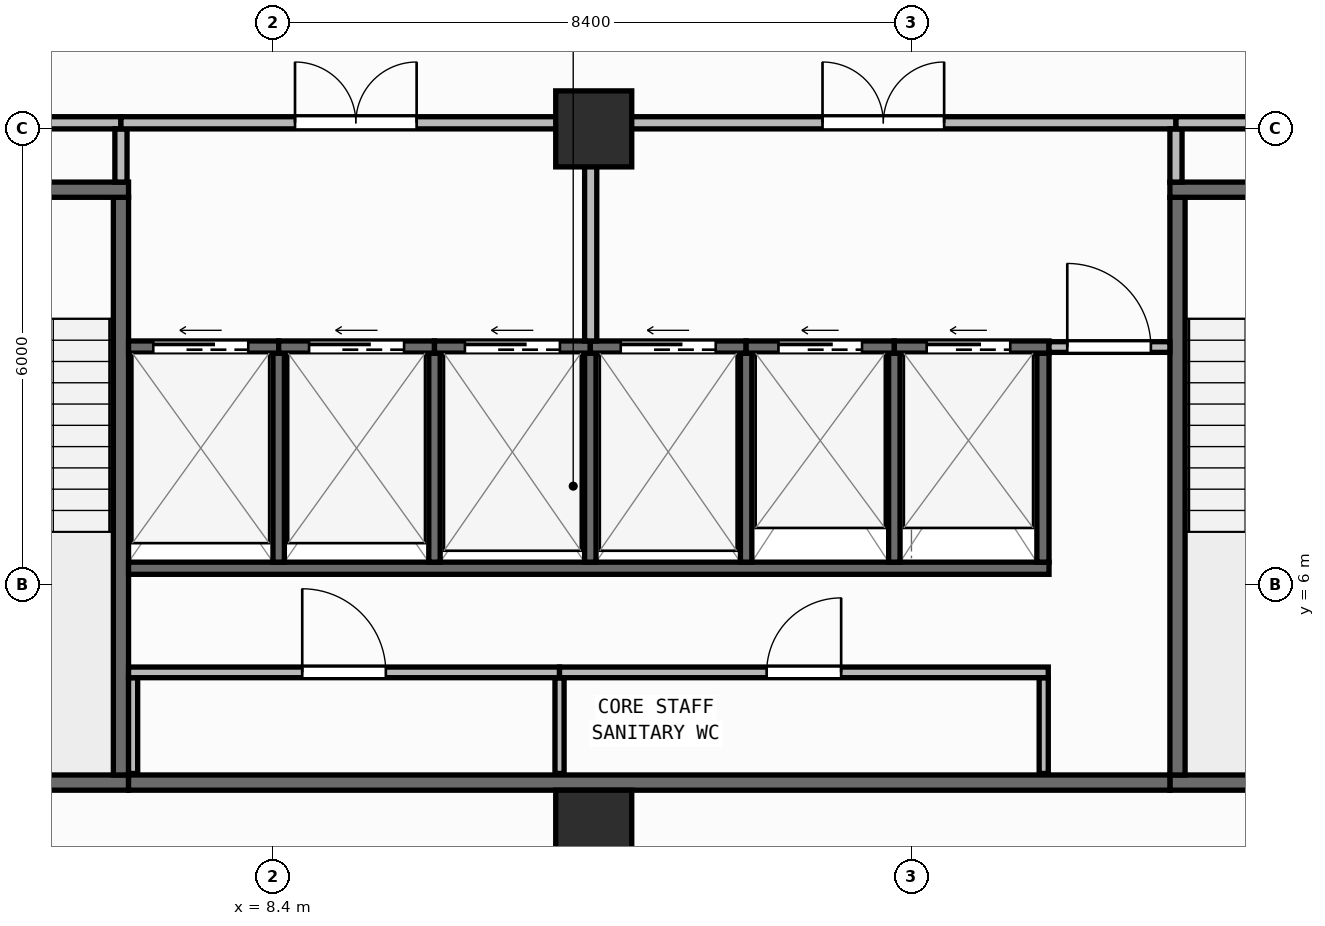
"""IFC4 building model, lengths in metres.
Left out: names, types, materials, properties, quantities, classifications, styles, units other than length and angle.
Written with IfcOpenShell. Run it as: python <this file> out.ifc"""

import sys

from ifc_helpers import new_model, si_unit, direction, frame, frame_2d, origin, origin_2d, place, context, subcontext, project, spatial, rectangle, extrude, element, fill, save


model = new_model("IFC4")
c1 = context("Model", 3, precision=1e-05, world=origin(), true_north=direction((0.0, 1.0)))
c2 = subcontext(c1, "Body", "Model", "MODEL_VIEW")
j1 = project(units=[si_unit("LENGTHUNIT", "METRE"), si_unit("PLANEANGLEUNIT", "RADIAN")], contexts=[c1])
p1 = place(None, origin())
s1 = spatial("IfcSite", under=j1, at=p1, CompositionType="ELEMENT")
p2 = place(p1, origin())
s2 = spatial("IfcBuilding", under=s1, at=p2, CompositionType="ELEMENT")
p3 = place(p2, frame((0.0, 0.0, 188.15)))
s3 = spatial("IfcBuildingStorey", under=s2, at=p3, CompositionType="ELEMENT", Elevation=188.15)
for number, where, z_axis, x_axis in (
    (1, (12.62, 2.8, 0.0), (0.0, 0.0, 1.0), (1.0, 0.0, 0.0)),
    (2, (12.62, 12.0, 0.0), (0.0, 0.0, 1.0), (1.0, 0.0, 0.0)),
):
    element("IfcColumn", number, at=place(p3, frame(where, z_axis=z_axis, x_axis=x_axis)), inside=s3, PredefinedType="COLUMN", context=c2, shape_type="SweptSolid", body=[
        extrude(rectangle(XDim=1.0, YDim=1.0, at=origin_2d()), origin(), (0.0, 0.0, 1.0), 3.95),
    ])
p4 = place(p3, frame((2.66, 0.174, 0.0), z_axis=(0.0, 0.0, 1.0), x_axis=(0.996634028439, 0.081979347142, 0.0)))
e3 = element("IfcWall", 3, at=p4, inside=s3, PredefinedType="STANDARD", context=c2, shape_type="SweptSolid", body=[
    extrude(rectangle(XDim=46.035, YDim=0.26, at=frame_2d((23.018, 0.0))), origin(), (0.0, 0.0, 1.0), 3.71),
])
p5 = place(p4, frame((21.817, 0.0, 0.9)))
e4 = element("IfcOpeningElement", 4, at=p5, cuts=e3, PredefinedType="OPENING", context=c2, shape_type="SweptSolid", body=[
    extrude(rectangle(XDim=2.4, YDim=1.65, at=frame_2d((1.2, 0.825))), frame((0.0, 0.14, 0.0), z_axis=(0.0, -1.0, 0.0), x_axis=(1.0, 0.0, 0.0)), (0.0, 0.0, 1.0), 0.28),
])
p6 = place(p3, frame((2.8, 3.4, 0.0), z_axis=(0.0, 0.0, 1.0), x_axis=(1.0, 0.0, 0.0)))
e5 = element("IfcWall", 5, at=p6, inside=s3, PredefinedType="SHEAR", context=c2, shape_type="SweptSolid", body=[
    extrude(rectangle(XDim=3.7, YDim=0.2, at=frame_2d((1.85, 0.0))), origin(), (0.0, 0.0, 1.0), 3.71),
])
p7 = place(p3, frame((6.4, 3.5, 0.0), z_axis=(0.0, 0.0, 1.0), x_axis=(0.0, 1.0, 0.0)))
e6 = element("IfcWall", 6, at=p7, inside=s3, PredefinedType="SHEAR", context=c2, shape_type="SweptSolid", body=[
    extrude(rectangle(XDim=7.6, YDim=0.2, at=frame_2d((3.8, 0.0))), origin(), (0.0, 0.0, 1.0), 3.71),
])
p8 = place(p3, frame((2.8, 11.2, 0.0), z_axis=(0.0, 0.0, 1.0), x_axis=(1.0, 0.0, 0.0)))
e7 = element("IfcWall", 7, at=p8, inside=s3, PredefinedType="SHEAR", context=c2, shape_type="SweptSolid", body=[
    extrude(rectangle(XDim=3.7, YDim=0.2, at=frame_2d((1.85, 0.0))), origin(), (0.0, 0.0, 1.0), 3.71),
])
p9 = place(p8, frame((1.2, 0.0, 0.0)))
e8 = element("IfcOpeningElement", 8, at=p9, cuts=e7, PredefinedType="OPENING", context=c2, shape_type="SweptSolid", body=[
    extrude(rectangle(XDim=1.3, YDim=2.15, at=frame_2d((0.65, 1.075))), frame((0.0, 0.11, 0.0), z_axis=(0.0, -1.0, 0.0), x_axis=(1.0, 0.0, 0.0)), (0.0, 0.0, 1.0), 0.22),
])
p10 = place(p3, frame((20.2, 3.4, 0.0), z_axis=(0.0, 0.0, 1.0), x_axis=(1.0, 0.0, 0.0)))
e9 = element("IfcWall", 9, at=p10, inside=s3, PredefinedType="SHEAR", context=c2, shape_type="SweptSolid", body=[
    extrude(rectangle(XDim=3.7, YDim=0.2, at=frame_2d((1.85, 0.0))), origin(), (0.0, 0.0, 1.0), 3.71),
])
p11 = place(p3, frame((20.3, 3.5, 0.0), z_axis=(0.0, 0.0, 1.0), x_axis=(0.0, 1.0, 0.0)))
e10 = element("IfcWall", 10, at=p11, inside=s3, PredefinedType="SHEAR", context=c2, shape_type="SweptSolid", body=[
    extrude(rectangle(XDim=7.6, YDim=0.2, at=frame_2d((3.8, 0.0))), origin(), (0.0, 0.0, 1.0), 3.71),
])
p12 = place(p3, frame((20.2, 11.2, 0.0), z_axis=(0.0, 0.0, 1.0), x_axis=(1.0, 0.0, 0.0)))
e11 = element("IfcWall", 11, at=p12, inside=s3, PredefinedType="SHEAR", context=c2, shape_type="SweptSolid", body=[
    extrude(rectangle(XDim=3.7, YDim=0.2, at=frame_2d((1.85, 0.0))), origin(), (0.0, 0.0, 1.0), 3.71),
])
p13 = place(p12, frame((1.2, 0.0, 0.0)))
e12 = element("IfcOpeningElement", 12, at=p13, cuts=e11, PredefinedType="OPENING", context=c2, shape_type="SweptSolid", body=[
    extrude(rectangle(XDim=1.3, YDim=2.15, at=frame_2d((0.65, 1.075))), frame((0.0, 0.11, 0.0), z_axis=(0.0, -1.0, 0.0), x_axis=(1.0, 0.0, 0.0)), (0.0, 0.0, 1.0), 0.22),
])
p14 = place(p3, frame((6.5, 3.4, 0.0), z_axis=(0.0, 0.0, 1.0), x_axis=(1.0, 0.0, 0.0)))
e13 = element("IfcWall", 13, at=p14, inside=s3, PredefinedType="SHEAR", context=c2, shape_type="SweptSolid", body=[
    extrude(rectangle(XDim=13.7, YDim=0.2, at=frame_2d((6.85, 0.0))), origin(), (0.0, 0.0, 1.0), 3.71),
])
p15 = place(p3, frame((6.5, 6.22, 0.0), z_axis=(0.0, 0.0, 1.0), x_axis=(1.0, 0.0, 0.0)))
e14 = element("IfcWall", 14, at=p15, inside=s3, PredefinedType="SHEAR", context=c2, shape_type="SweptSolid", body=[
    extrude(rectangle(XDim=12.11, YDim=0.16, at=frame_2d((6.055, 0.0))), origin(), (0.0, 0.0, 1.0), 3.71),
])
p16 = place(p3, frame((18.53, 6.3, 0.0), z_axis=(0.0, 0.0, 1.0), x_axis=(0.0, 1.0, 0.0)))
e15 = element("IfcWall", 15, at=p16, inside=s3, PredefinedType="SHEAR", context=c2, shape_type="SweptSolid", body=[
    extrude(rectangle(XDim=2.75, YDim=0.16, at=frame_2d((1.375, 0.0))), origin(), (0.0, 0.0, 1.0), 3.71),
])
for number, where, z_axis, x_axis in (
    (16, (8.475, 6.3, 0.0), (0.0, 0.0, 1.0), (0.0, 1.0, 0.0)),
    (17, (10.525, 6.3, 0.0), (0.0, 0.0, 1.0), (0.0, 1.0, 0.0)),
    (18, (12.575, 6.3, 0.0), (0.0, 0.0, 1.0), (0.0, 1.0, 0.0)),
    (19, (14.625, 6.3, 0.0), (0.0, 0.0, 1.0), (0.0, 1.0, 0.0)),
    (20, (16.575, 6.3, 0.0), (0.0, 0.0, 1.0), (0.0, 1.0, 0.0)),
):
    element("IfcWall", number, at=place(p3, frame(where, z_axis=z_axis, x_axis=x_axis)), inside=s3, PredefinedType="SHEAR", context=c2, shape_type="SweptSolid", body=[
        extrude(rectangle(XDim=2.75, YDim=0.15, at=frame_2d((1.375, 0.0))), origin(), (0.0, 0.0, 1.0), 3.71),
    ])
p17 = place(p3, frame((6.5, 9.13, 0.0), z_axis=(0.0, 0.0, 1.0), x_axis=(1.0, 0.0, 0.0)))
e21 = element("IfcWall", 21, at=p17, inside=s3, PredefinedType="SHEAR", context=c2, shape_type="SweptSolid", body=[
    extrude(rectangle(XDim=1.975, YDim=0.16, at=frame_2d((0.988, 0.0))), origin(), (0.0, 0.0, 1.0), 3.71),
])
p18 = place(p17, frame((0.325, 0.0, 0.0)))
e22 = element("IfcOpeningElement", 22, at=p18, cuts=e21, PredefinedType="OPENING", context=c2, shape_type="SweptSolid", body=[
    extrude(rectangle(XDim=1.25, YDim=2.15, at=frame_2d((0.625, 1.075))), frame((0.0, 0.09, 0.0), z_axis=(0.0, -1.0, 0.0), x_axis=(1.0, 0.0, 0.0)), (0.0, 0.0, 1.0), 0.18),
])
p19 = place(p3, frame((8.475, 9.13, 0.0), z_axis=(0.0, 0.0, 1.0), x_axis=(1.0, 0.0, 0.0)))
e23 = element("IfcWall", 23, at=p19, inside=s3, PredefinedType="SHEAR", context=c2, shape_type="SweptSolid", body=[
    extrude(rectangle(XDim=2.05, YDim=0.16, at=frame_2d((1.025, 0.0))), origin(), (0.0, 0.0, 1.0), 3.71),
])
p20 = place(p19, frame((0.4, 0.0, 0.0)))
e24 = element("IfcOpeningElement", 24, at=p20, cuts=e23, PredefinedType="OPENING", context=c2, shape_type="SweptSolid", body=[
    extrude(rectangle(XDim=1.25, YDim=2.15, at=frame_2d((0.625, 1.075))), frame((0.0, 0.09, 0.0), z_axis=(0.0, -1.0, 0.0), x_axis=(1.0, 0.0, 0.0)), (0.0, 0.0, 1.0), 0.18),
])
p21 = place(p3, frame((10.525, 9.13, 0.0), z_axis=(0.0, 0.0, 1.0), x_axis=(1.0, 0.0, 0.0)))
e25 = element("IfcWall", 25, at=p21, inside=s3, PredefinedType="SHEAR", context=c2, shape_type="SweptSolid", body=[
    extrude(rectangle(XDim=2.05, YDim=0.16, at=frame_2d((1.025, 0.0))), origin(), (0.0, 0.0, 1.0), 3.71),
])
p22 = place(p21, frame((0.4, 0.0, 0.0)))
e26 = element("IfcOpeningElement", 26, at=p22, cuts=e25, PredefinedType="OPENING", context=c2, shape_type="SweptSolid", body=[
    extrude(rectangle(XDim=1.25, YDim=2.15, at=frame_2d((0.625, 1.075))), frame((0.0, 0.09, 0.0), z_axis=(0.0, -1.0, 0.0), x_axis=(1.0, 0.0, 0.0)), (0.0, 0.0, 1.0), 0.18),
])
p23 = place(p3, frame((12.575, 9.13, 0.0), z_axis=(0.0, 0.0, 1.0), x_axis=(1.0, 0.0, 0.0)))
e27 = element("IfcWall", 27, at=p23, inside=s3, PredefinedType="SHEAR", context=c2, shape_type="SweptSolid", body=[
    extrude(rectangle(XDim=2.05, YDim=0.16, at=frame_2d((1.025, 0.0))), origin(), (0.0, 0.0, 1.0), 3.71),
])
p24 = place(p23, frame((0.4, 0.0, 0.0)))
e28 = element("IfcOpeningElement", 28, at=p24, cuts=e27, PredefinedType="OPENING", context=c2, shape_type="SweptSolid", body=[
    extrude(rectangle(XDim=1.25, YDim=2.15, at=frame_2d((0.625, 1.075))), frame((0.0, 0.09, 0.0), z_axis=(0.0, -1.0, 0.0), x_axis=(1.0, 0.0, 0.0)), (0.0, 0.0, 1.0), 0.18),
])
p25 = place(p3, frame((14.625, 9.13, 0.0), z_axis=(0.0, 0.0, 1.0), x_axis=(1.0, 0.0, 0.0)))
e29 = element("IfcWall", 29, at=p25, inside=s3, PredefinedType="SHEAR", context=c2, shape_type="SweptSolid", body=[
    extrude(rectangle(XDim=1.95, YDim=0.16, at=frame_2d((0.975, 0.0))), origin(), (0.0, 0.0, 1.0), 3.71),
])
p26 = place(p25, frame((0.425, 0.0, 0.0)))
e30 = element("IfcOpeningElement", 30, at=p26, cuts=e29, PredefinedType="OPENING", context=c2, shape_type="SweptSolid", body=[
    extrude(rectangle(XDim=1.1, YDim=2.15, at=frame_2d((0.55, 1.075))), frame((0.0, 0.09, 0.0), z_axis=(0.0, -1.0, 0.0), x_axis=(1.0, 0.0, 0.0)), (0.0, 0.0, 1.0), 0.18),
])
p27 = place(p3, frame((16.575, 9.13, 0.0), z_axis=(0.0, 0.0, 1.0), x_axis=(1.0, 0.0, 0.0)))
e31 = element("IfcWall", 31, at=p27, inside=s3, PredefinedType="SHEAR", context=c2, shape_type="SweptSolid", body=[
    extrude(rectangle(XDim=2.035, YDim=0.16, at=frame_2d((1.018, 0.0))), origin(), (0.0, 0.0, 1.0), 3.71),
])
p28 = place(p27, frame((0.425, 0.0, 0.0)))
e32 = element("IfcOpeningElement", 32, at=p28, cuts=e31, PredefinedType="OPENING", context=c2, shape_type="SweptSolid", body=[
    extrude(rectangle(XDim=1.1, YDim=2.15, at=frame_2d((0.55, 1.075))), frame((0.0, 0.09, 0.0), z_axis=(0.0, -1.0, 0.0), x_axis=(1.0, 0.0, 0.0)), (0.0, 0.0, 1.0), 0.18),
])
for number, where, z_axis, x_axis in (
    (33, (6.56, 3.52, 0.0), (0.0, 0.0, 1.0), (0.0, 1.0, 0.0)),
    (34, (12.17, 3.52, 0.0), (0.0, 0.0, 1.0), (0.0, 1.0, 0.0)),
    (35, (18.54, 3.52, 0.0), (0.0, 0.0, 1.0), (0.0, 1.0, 0.0)),
):
    element("IfcWall", number, at=place(p3, frame(where, z_axis=z_axis, x_axis=x_axis)), inside=s3, PredefinedType="PARTITIONING", context=c2, shape_type="SweptSolid", body=[
        extrude(rectangle(XDim=1.26, YDim=0.12, at=frame_2d((0.63, 0.0))), origin(), (0.0, 0.0, 1.0), 3.71),
    ])
p29 = place(p3, frame((6.5, 4.85, 0.0), z_axis=(0.0, 0.0, 1.0), x_axis=(1.0, 0.0, 0.0)))
e36 = element("IfcWall", 36, at=p29, inside=s3, PredefinedType="PARTITIONING", context=c2, shape_type="SweptSolid", body=[
    extrude(rectangle(XDim=5.67, YDim=0.14, at=frame_2d((2.835, 0.0))), origin(), (0.0, 0.0, 1.0), 3.71),
])
p30 = place(p29, frame((2.285, 0.0, 0.0)))
e37 = element("IfcOpeningElement", 37, at=p30, cuts=e36, PredefinedType="OPENING", context=c2, shape_type="SweptSolid", body=[
    extrude(rectangle(XDim=1.1, YDim=2.1, at=frame_2d((0.55, 1.05))), frame((0.0, 0.08, 0.0), z_axis=(0.0, -1.0, 0.0), x_axis=(1.0, 0.0, 0.0)), (0.0, 0.0, 1.0), 0.16),
])
p31 = place(p3, frame((12.17, 4.85, 0.0), z_axis=(0.0, 0.0, 1.0), x_axis=(1.0, 0.0, 0.0)))
e38 = element("IfcWall", 38, at=p31, inside=s3, PredefinedType="PARTITIONING", context=c2, shape_type="SweptSolid", body=[
    extrude(rectangle(XDim=6.43, YDim=0.14, at=frame_2d((3.215, 0.0))), origin(), (0.0, 0.0, 1.0), 3.71),
])
p32 = place(p31, frame((2.725, 0.0, 0.0)))
e39 = element("IfcOpeningElement", 39, at=p32, cuts=e38, PredefinedType="OPENING", context=c2, shape_type="SweptSolid", body=[
    extrude(rectangle(XDim=0.98, YDim=2.1, at=frame_2d((0.49, 1.05))), frame((0.0, 0.08, 0.0), z_axis=(0.0, -1.0, 0.0), x_axis=(1.0, 0.0, 0.0)), (0.0, 0.0, 1.0), 0.16),
])
p33 = place(p3, frame((18.61, 9.13, 0.0), z_axis=(0.0, 0.0, 1.0), x_axis=(1.0, 0.0, 0.0)))
e40 = element("IfcWall", 40, at=p33, inside=s3, PredefinedType="PARTITIONING", context=c2, shape_type="SweptSolid", body=[
    extrude(rectangle(XDim=1.59, YDim=0.14, at=frame_2d((0.795, 0.0))), origin(), (0.0, 0.0, 1.0), 3.71),
])
p34 = place(p33, frame((0.24, 0.0, 0.0)))
e41 = element("IfcOpeningElement", 41, at=p34, cuts=e40, PredefinedType="OPENING", context=c2, shape_type="SweptSolid", body=[
    extrude(rectangle(XDim=1.1, YDim=2.1, at=frame_2d((0.55, 1.05))), frame((0.0, 0.08, 0.0), z_axis=(0.0, -1.0, 0.0), x_axis=(1.0, 0.0, 0.0)), (0.0, 0.0, 1.0), 0.16),
])
p35 = place(p3, frame((2.8, 12.08, 0.0), z_axis=(0.0, 0.0, 1.0), x_axis=(1.0, 0.0, 0.0)))
e42 = element("IfcWall", 42, at=p35, inside=s3, PredefinedType="PARTITIONING", context=c2, shape_type="SweptSolid", body=[
    extrude(rectangle(XDim=3.6, YDim=0.16, at=frame_2d((1.8, 0.0))), origin(), (0.0, 0.0, 1.0), 3.152),
])
p36 = place(p35, frame((1.0, 0.0, 0.0)))
e43 = element("IfcOpeningElement", 43, at=p36, cuts=e42, PredefinedType="OPENING", context=c2, shape_type="SweptSolid", body=[
    extrude(rectangle(XDim=1.6, YDim=2.05, at=frame_2d((0.8, 1.025))), frame((0.0, 0.09, 0.0), z_axis=(0.0, -1.0, 0.0), x_axis=(1.0, 0.0, 0.0)), (0.0, 0.0, 1.0), 0.18),
])
p37 = place(p3, frame((6.4, 11.3, 0.0), z_axis=(0.0, 0.0, 1.0), x_axis=(0.0, 1.0, 0.0)))
e44 = element("IfcWall", 44, at=p37, inside=s3, PredefinedType="PARTITIONING", context=c2, shape_type="SweptSolid", body=[
    extrude(rectangle(XDim=0.7, YDim=0.16, at=frame_2d((0.35, 0.0))), origin(), (0.0, 0.0, 1.0), 3.71),
])
p38 = place(p3, frame((6.4, 12.08, 0.0), z_axis=(0.0, 0.0, 1.0), x_axis=(1.0, 0.0, 0.0)))
e45 = element("IfcWall", 45, at=p38, inside=s3, PredefinedType="PARTITIONING", context=c2, shape_type="SweptSolid", body=[
    extrude(rectangle(XDim=6.18, YDim=0.16, at=frame_2d((3.09, 0.0))), origin(), (0.0, 0.0, 1.0), 3.152),
])
p39 = place(p38, frame((2.29, 0.0, 0.0)))
e46 = element("IfcOpeningElement", 46, at=p39, cuts=e45, PredefinedType="OPENING", context=c2, shape_type="SweptSolid", body=[
    extrude(rectangle(XDim=1.6, YDim=2.05, at=frame_2d((0.8, 1.025))), frame((0.0, 0.09, 0.0), z_axis=(0.0, -1.0, 0.0), x_axis=(1.0, 0.0, 0.0)), (0.0, 0.0, 1.0), 0.18),
])
p40 = place(p3, frame((12.58, 9.21, 0.0), z_axis=(0.0, 0.0, 1.0), x_axis=(0.0, 1.0, 0.0)))
e47 = element("IfcWall", 47, at=p40, inside=s3, PredefinedType="PARTITIONING", context=c2, shape_type="SweptSolid", body=[
    extrude(rectangle(XDim=2.79, YDim=0.16, at=frame_2d((1.395, 0.0))), origin(), (0.0, 0.0, 1.0), 3.71),
])
p41 = place(p3, frame((12.58, 12.08, 0.0), z_axis=(0.0, 0.0, 1.0), x_axis=(1.0, 0.0, 0.0)))
e48 = element("IfcWall", 48, at=p41, inside=s3, PredefinedType="PARTITIONING", context=c2, shape_type="SweptSolid", body=[
    extrude(rectangle(XDim=7.7, YDim=0.16, at=frame_2d((3.85, 0.0))), origin(), (0.0, 0.0, 1.0), 3.152),
])
p42 = place(p41, frame((3.05, 0.0, 0.0)))
e49 = element("IfcOpeningElement", 49, at=p42, cuts=e48, PredefinedType="OPENING", context=c2, shape_type="SweptSolid", body=[
    extrude(rectangle(XDim=1.6, YDim=2.05, at=frame_2d((0.8, 1.025))), frame((0.0, 0.09, 0.0), z_axis=(0.0, -1.0, 0.0), x_axis=(1.0, 0.0, 0.0)), (0.0, 0.0, 1.0), 0.18),
])
p43 = place(p3, frame((20.28, 11.3, 0.0), z_axis=(0.0, 0.0, 1.0), x_axis=(0.0, 1.0, 0.0)))
e50 = element("IfcWall", 50, at=p43, inside=s3, PredefinedType="PARTITIONING", context=c2, shape_type="SweptSolid", body=[
    extrude(rectangle(XDim=0.7, YDim=0.16, at=frame_2d((0.35, 0.0))), origin(), (0.0, 0.0, 1.0), 3.71),
])
p44 = place(p3, frame((20.28, 12.08, 0.0), z_axis=(0.0, 0.0, 1.0), x_axis=(1.0, 0.0, 0.0)))
e51 = element("IfcWall", 51, at=p44, inside=s3, PredefinedType="PARTITIONING", context=c2, shape_type="SweptSolid", body=[
    extrude(rectangle(XDim=3.62, YDim=0.16, at=frame_2d((1.81, 0.0))), origin(), (0.0, 0.0, 1.0), 3.152),
])
p45 = place(p44, frame((1.01, 0.0, 0.0)))
e52 = element("IfcOpeningElement", 52, at=p45, cuts=e51, PredefinedType="OPENING", context=c2, shape_type="SweptSolid", body=[
    extrude(rectangle(XDim=1.6, YDim=2.05, at=frame_2d((0.8, 1.025))), frame((0.0, 0.09, 0.0), z_axis=(0.0, -1.0, 0.0), x_axis=(1.0, 0.0, 0.0)), (0.0, 0.0, 1.0), 0.18),
])
p46 = place(p18, origin())
e53 = element("IfcDoor", 53, at=p46, inside=s3, OperationType="SLIDING_TO_LEFT", PredefinedType="DOOR", context=c2, shape_type="SweptSolid", body=[
    extrude(rectangle(XDim=1.25, YDim=2.15, at=frame_2d((0.625, 1.075))), frame((0.0, 0.025, 0.0), z_axis=(0.0, -1.0, 0.0), x_axis=(1.0, 0.0, 0.0)), (0.0, 0.0, 1.0), 0.05),
])
fill(e22, e53)
p47 = place(p20, origin())
e54 = element("IfcDoor", 54, at=p47, inside=s3, OperationType="SLIDING_TO_LEFT", PredefinedType="DOOR", context=c2, shape_type="SweptSolid", body=[
    extrude(rectangle(XDim=1.25, YDim=2.15, at=frame_2d((0.625, 1.075))), frame((0.0, 0.025, 0.0), z_axis=(0.0, -1.0, 0.0), x_axis=(1.0, 0.0, 0.0)), (0.0, 0.0, 1.0), 0.05),
])
fill(e24, e54)
p48 = place(p22, origin())
e55 = element("IfcDoor", 55, at=p48, inside=s3, OperationType="SLIDING_TO_LEFT", PredefinedType="DOOR", context=c2, shape_type="SweptSolid", body=[
    extrude(rectangle(XDim=1.25, YDim=2.15, at=frame_2d((0.625, 1.075))), frame((0.0, 0.025, 0.0), z_axis=(0.0, -1.0, 0.0), x_axis=(1.0, 0.0, 0.0)), (0.0, 0.0, 1.0), 0.05),
])
fill(e26, e55)
p49 = place(p24, origin())
e56 = element("IfcDoor", 56, at=p49, inside=s3, OperationType="SLIDING_TO_LEFT", PredefinedType="DOOR", context=c2, shape_type="SweptSolid", body=[
    extrude(rectangle(XDim=1.25, YDim=2.15, at=frame_2d((0.625, 1.075))), frame((0.0, 0.025, 0.0), z_axis=(0.0, -1.0, 0.0), x_axis=(1.0, 0.0, 0.0)), (0.0, 0.0, 1.0), 0.05),
])
fill(e28, e56)
p50 = place(p26, origin())
e57 = element("IfcDoor", 57, at=p50, inside=s3, OperationType="SLIDING_TO_LEFT", PredefinedType="DOOR", context=c2, shape_type="SweptSolid", body=[
    extrude(rectangle(XDim=1.1, YDim=2.15, at=frame_2d((0.55, 1.075))), frame((0.0, 0.025, 0.0), z_axis=(0.0, -1.0, 0.0), x_axis=(1.0, 0.0, 0.0)), (0.0, 0.0, 1.0), 0.05),
])
fill(e30, e57)
p51 = place(p28, origin())
e58 = element("IfcDoor", 58, at=p51, inside=s3, OperationType="SLIDING_TO_LEFT", PredefinedType="DOOR", context=c2, shape_type="SweptSolid", body=[
    extrude(rectangle(XDim=1.1, YDim=2.15, at=frame_2d((0.55, 1.075))), frame((0.0, 0.025, 0.0), z_axis=(0.0, -1.0, 0.0), x_axis=(1.0, 0.0, 0.0)), (0.0, 0.0, 1.0), 0.05),
])
fill(e32, e58)
p52 = place(p30, origin())
e59 = element("IfcDoor", 59, at=p52, inside=s3, OperationType="SINGLE_SWING_LEFT", PredefinedType="DOOR", context=c2, shape_type="SweptSolid", body=[
    extrude(rectangle(XDim=1.1, YDim=2.1, at=frame_2d((0.55, 1.05))), frame((0.0, 0.025, 0.0), z_axis=(0.0, -1.0, 0.0), x_axis=(1.0, 0.0, 0.0)), (0.0, 0.0, 1.0), 0.05),
])
fill(e37, e59)
p53 = place(p32, origin())
e60 = element("IfcDoor", 60, at=p53, inside=s3, OperationType="SINGLE_SWING_RIGHT", PredefinedType="DOOR", context=c2, shape_type="SweptSolid", body=[
    extrude(rectangle(XDim=0.98, YDim=2.1, at=frame_2d((0.49, 1.05))), frame((0.0, 0.025, 0.0), z_axis=(0.0, -1.0, 0.0), x_axis=(1.0, 0.0, 0.0)), (0.0, 0.0, 1.0), 0.05),
])
fill(e39, e60)
p54 = place(p34, origin())
e61 = element("IfcDoor", 61, at=p54, inside=s3, OperationType="SINGLE_SWING_LEFT", PredefinedType="DOOR", context=c2, shape_type="SweptSolid", body=[
    extrude(rectangle(XDim=1.1, YDim=2.1, at=frame_2d((0.55, 1.05))), frame((0.0, 0.025, 0.0), z_axis=(0.0, -1.0, 0.0), x_axis=(1.0, 0.0, 0.0)), (0.0, 0.0, 1.0), 0.05),
])
fill(e41, e61)
p55 = place(p39, origin())
e62 = element("IfcDoor", 62, at=p55, inside=s3, OperationType="DOUBLE_DOOR_SINGLE_SWING", PredefinedType="DOOR", context=c2, shape_type="SweptSolid", body=[
    extrude(rectangle(XDim=1.6, YDim=2.05, at=frame_2d((0.8, 1.025))), frame((0.0, 0.025, 0.0), z_axis=(0.0, -1.0, 0.0), x_axis=(1.0, 0.0, 0.0)), (0.0, 0.0, 1.0), 0.05),
])
fill(e46, e62)
p56 = place(p42, origin())
e63 = element("IfcDoor", 63, at=p56, inside=s3, OperationType="DOUBLE_DOOR_SINGLE_SWING", PredefinedType="DOOR", context=c2, shape_type="SweptSolid", body=[
    extrude(rectangle(XDim=1.6, YDim=2.05, at=frame_2d((0.8, 1.025))), frame((0.0, 0.025, 0.0), z_axis=(0.0, -1.0, 0.0), x_axis=(1.0, 0.0, 0.0)), (0.0, 0.0, 1.0), 0.05),
])
fill(e49, e63)
save(model, sys.argv[1])
